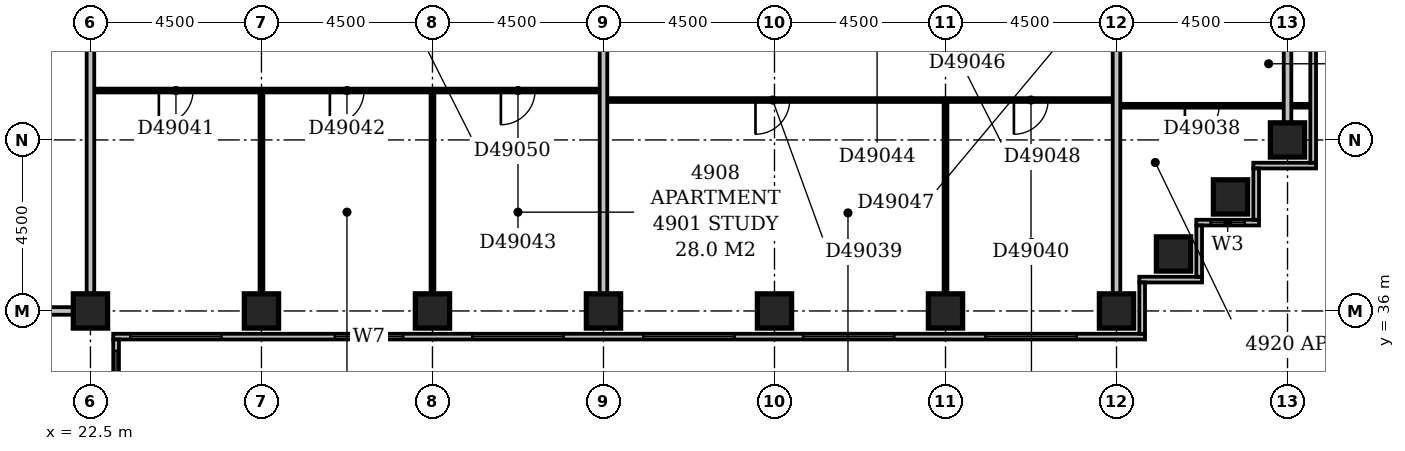
"""IFC4 building model, lengths in metres.
Left out: names, types, materials, properties, quantities, classifications, styles, units other than length and angle.
Written with IfcOpenShell. Run it as: python <this file> out.ifc"""

import sys

from ifc_helpers import new_model, si_unit, direction, frame, frame_2d, origin, origin_2d, place, context, subcontext, project, spatial, rectangle, extrude, element, fill, save


model = new_model("IFC4")
c1 = context("Model", 3, precision=1e-05, world=origin(), true_north=direction((0.0, 1.0)))
c2 = subcontext(c1, "Body", "Model", "MODEL_VIEW")
j1 = project(units=[si_unit("LENGTHUNIT", "METRE"), si_unit("PLANEANGLEUNIT", "RADIAN")], contexts=[c1])
p1 = place(None, origin())
s1 = spatial("IfcSite", under=j1, at=p1, CompositionType="ELEMENT")
p2 = place(p1, origin())
s2 = spatial("IfcBuilding", under=s1, at=p2, CompositionType="ELEMENT")
p3 = place(p2, frame((0.0, 0.0, 193.4)))
s3 = spatial("IfcBuildingStorey", under=s2, at=p3, CompositionType="ELEMENT", Elevation=193.4)
for number, where, z_axis, x_axis in (
    (1, (22.5, 36.0, -0.3), (0.0, 0.0, 1.0), (1.0, 0.0, 0.0)),
    (2, (27.0, 36.0, -0.3), (0.0, 0.0, 1.0), (1.0, 0.0, 0.0)),
    (3, (31.5, 36.0, -0.3), (0.0, 0.0, 1.0), (1.0, 0.0, 0.0)),
    (4, (36.0, 36.0, -0.3), (0.0, 0.0, 1.0), (1.0, 0.0, 0.0)),
    (5, (40.5, 36.0, -0.3), (0.0, 0.0, 1.0), (1.0, 0.0, 0.0)),
    (6, (45.0, 36.0, -0.3), (0.0, 0.0, 1.0), (1.0, 0.0, 0.0)),
    (7, (49.5, 36.0, -0.3), (0.0, 0.0, 1.0), (1.0, 0.0, 0.0)),
    (8, (51.0, 37.5, -0.3), (0.0, 0.0, 1.0), (1.0, 0.0, 0.0)),
    (9, (52.5, 39.0, -0.3), (0.0, 0.0, 1.0), (1.0, 0.0, 0.0)),
    (10, (54.0, 40.5, -0.3), (0.0, 0.0, 1.0), (1.0, 0.0, 0.0)),
):
    element("IfcColumn", number, at=place(p3, frame(where, z_axis=z_axis, x_axis=x_axis)), inside=s3, PredefinedType="COLUMN", context=c2, shape_type="SweptSolid", body=[
        extrude(rectangle(XDim=0.9, YDim=0.9, at=origin_2d()), origin(), (0.0, 0.0, 1.0), 3.6),
    ])
p4 = place(p3, frame((23.175, 17.4, 0.0), z_axis=(0.0, 0.0, 1.0), x_axis=(0.0, 1.0, 0.0)))
e11 = element("IfcWall", 11, at=p4, inside=s3, PredefinedType="STANDARD", context=c2, shape_type="SweptSolid", body=[
    extrude(rectangle(XDim=17.85, YDim=0.15, at=frame_2d((8.925, 0.0))), origin(), (0.0, 0.0, 1.0), 2.7),
])
p5 = place(p4, frame((1.65, 0.0, 0.6)))
e12 = element("IfcOpeningElement", 12, at=p5, cuts=e11, PredefinedType="OPENING", context=c2, shape_type="SweptSolid", body=[
    extrude(rectangle(XDim=2.4, YDim=1.8, at=frame_2d((1.2, 0.9))), frame((0.0, 0.087, 0.0), z_axis=(0.0, -1.0, 0.0), x_axis=(1.0, 0.0, 0.0)), (0.0, 0.0, 1.0), 0.174),
])
p6 = place(p4, frame((7.922, 0.0, 0.6)))
e13 = element("IfcOpeningElement", 13, at=p6, cuts=e11, PredefinedType="OPENING", context=c2, shape_type="SweptSolid", body=[
    extrude(rectangle(XDim=0.9, YDim=1.8, at=frame_2d((0.45, 0.9))), frame((0.0, 0.087, 0.0), z_axis=(0.0, -1.0, 0.0), x_axis=(1.0, 0.0, 0.0)), (0.0, 0.0, 1.0), 0.174),
])
p7 = place(p4, frame((10.65, 0.0, 0.6)))
e14 = element("IfcOpeningElement", 14, at=p7, cuts=e11, PredefinedType="OPENING", context=c2, shape_type="SweptSolid", body=[
    extrude(rectangle(XDim=2.4, YDim=1.8, at=frame_2d((1.2, 0.9))), frame((0.0, 0.087, 0.0), z_axis=(0.0, -1.0, 0.0), x_axis=(1.0, 0.0, 0.0)), (0.0, 0.0, 1.0), 0.174),
])
p8 = place(p4, frame((15.15, 0.0, 0.6)))
e15 = element("IfcOpeningElement", 15, at=p8, cuts=e11, PredefinedType="OPENING", context=c2, shape_type="SweptSolid", body=[
    extrude(rectangle(XDim=2.4, YDim=1.8, at=frame_2d((1.2, 0.9))), frame((0.0, 0.087, 0.0), z_axis=(0.0, -1.0, 0.0), x_axis=(1.0, 0.0, 0.0)), (0.0, 0.0, 1.0), 0.174),
])
p9 = place(p3, frame((23.1, 35.325, 0.0), z_axis=(0.0, 0.0, 1.0), x_axis=(1.0, 0.0, 0.0)))
e16 = element("IfcWall", 16, at=p9, inside=s3, PredefinedType="STANDARD", context=c2, shape_type="SweptSolid", body=[
    extrude(rectangle(XDim=27.15, YDim=0.15, at=frame_2d((13.575, 0.0))), origin(), (0.0, 0.0, 1.0), 2.7),
])
p10 = place(p9, frame((0.45, 0.0, 0.6)))
e17 = element("IfcOpeningElement", 17, at=p10, cuts=e16, PredefinedType="OPENING", context=c2, shape_type="SweptSolid", body=[
    extrude(rectangle(XDim=2.4, YDim=1.8, at=frame_2d((1.2, 0.9))), frame((0.0, 0.087, 0.0), z_axis=(0.0, -1.0, 0.0), x_axis=(1.0, 0.0, 0.0)), (0.0, 0.0, 1.0), 0.174),
])
p11 = place(p9, frame((5.831, 0.0, 0.6)))
e18 = element("IfcOpeningElement", 18, at=p11, cuts=e16, PredefinedType="OPENING", context=c2, shape_type="SweptSolid", body=[
    extrude(rectangle(XDim=1.8, YDim=1.8, at=frame_2d((0.9, 0.9))), frame((0.0, 0.087, 0.0), z_axis=(0.0, -1.0, 0.0), x_axis=(1.0, 0.0, 0.0)), (0.0, 0.0, 1.0), 0.174),
])
p12 = place(p9, frame((9.45, 0.0, 0.6)))
e19 = element("IfcOpeningElement", 19, at=p12, cuts=e16, PredefinedType="OPENING", context=c2, shape_type="SweptSolid", body=[
    extrude(rectangle(XDim=2.4, YDim=1.8, at=frame_2d((1.2, 0.9))), frame((0.0, 0.087, 0.0), z_axis=(0.0, -1.0, 0.0), x_axis=(1.0, 0.0, 0.0)), (0.0, 0.0, 1.0), 0.174),
])
p13 = place(p9, frame((13.95, 0.0, 0.6)))
e20 = element("IfcOpeningElement", 20, at=p13, cuts=e16, PredefinedType="OPENING", context=c2, shape_type="SweptSolid", body=[
    extrude(rectangle(XDim=2.4, YDim=1.8, at=frame_2d((1.2, 0.9))), frame((0.0, 0.087, 0.0), z_axis=(0.0, -1.0, 0.0), x_axis=(1.0, 0.0, 0.0)), (0.0, 0.0, 1.0), 0.174),
])
p14 = place(p9, frame((18.153, 0.0, 0.6)))
e21 = element("IfcOpeningElement", 21, at=p14, cuts=e16, PredefinedType="OPENING", context=c2, shape_type="SweptSolid", body=[
    extrude(rectangle(XDim=2.4, YDim=1.8, at=frame_2d((1.2, 0.9))), frame((0.0, 0.087, 0.0), z_axis=(0.0, -1.0, 0.0), x_axis=(1.0, 0.0, 0.0)), (0.0, 0.0, 1.0), 0.174),
])
p15 = place(p9, frame((22.95, 0.0, 0.6)))
e22 = element("IfcOpeningElement", 22, at=p15, cuts=e16, PredefinedType="OPENING", context=c2, shape_type="SweptSolid", body=[
    extrude(rectangle(XDim=2.4, YDim=1.8, at=frame_2d((1.2, 0.9))), frame((0.0, 0.087, 0.0), z_axis=(0.0, -1.0, 0.0), x_axis=(1.0, 0.0, 0.0)), (0.0, 0.0, 1.0), 0.174),
])
p16 = place(p3, frame((50.175, 35.4, 0.0), z_axis=(0.0, 0.0, 1.0), x_axis=(0.0, 1.0, 0.0)))
e23 = element("IfcWall", 23, at=p16, inside=s3, PredefinedType="STANDARD", context=c2, shape_type="SweptSolid", body=[
    extrude(rectangle(XDim=1.35, YDim=0.15, at=frame_2d((0.675, 0.0))), origin(), (0.0, 0.0, 1.0), 2.7),
])
p17 = place(p3, frame((50.1, 36.825, 0.0), z_axis=(0.0, 0.0, 1.0), x_axis=(1.0, 0.0, 0.0)))
e24 = element("IfcWall", 24, at=p17, inside=s3, PredefinedType="STANDARD", context=c2, shape_type="SweptSolid", body=[
    extrude(rectangle(XDim=1.65, YDim=0.15, at=frame_2d((0.825, 0.0))), origin(), (0.0, 0.0, 1.0), 2.7),
])
p18 = place(p3, frame((51.675, 36.9, 0.0), z_axis=(0.0, 0.0, 1.0), x_axis=(0.0, 1.0, 0.0)))
e25 = element("IfcWall", 25, at=p18, inside=s3, PredefinedType="STANDARD", context=c2, shape_type="SweptSolid", body=[
    extrude(rectangle(XDim=1.35, YDim=0.15, at=frame_2d((0.675, 0.0))), origin(), (0.0, 0.0, 1.0), 2.7),
])
p19 = place(p3, frame((51.6, 38.325, 0.0), z_axis=(0.0, 0.0, 1.0), x_axis=(1.0, 0.0, 0.0)))
e26 = element("IfcWall", 26, at=p19, inside=s3, PredefinedType="STANDARD", context=c2, shape_type="SweptSolid", body=[
    extrude(rectangle(XDim=1.65, YDim=0.15, at=frame_2d((0.825, 0.0))), origin(), (0.0, 0.0, 1.0), 2.7),
])
p20 = place(p19, frame((0.375, 0.0, 0.6)))
e27 = element("IfcOpeningElement", 27, at=p20, cuts=e26, PredefinedType="OPENING", context=c2, shape_type="SweptSolid", body=[
    extrude(rectangle(XDim=0.9, YDim=1.8, at=frame_2d((0.45, 0.9))), frame((0.0, 0.087, 0.0), z_axis=(0.0, -1.0, 0.0), x_axis=(1.0, 0.0, 0.0)), (0.0, 0.0, 1.0), 0.174),
])
p21 = place(p3, frame((53.175, 38.4, 0.0), z_axis=(0.0, 0.0, 1.0), x_axis=(0.0, 1.0, 0.0)))
e28 = element("IfcWall", 28, at=p21, inside=s3, PredefinedType="STANDARD", context=c2, shape_type="SweptSolid", body=[
    extrude(rectangle(XDim=1.35, YDim=0.15, at=frame_2d((0.675, 0.0))), origin(), (0.0, 0.0, 1.0), 2.7),
])
p22 = place(p3, frame((53.1, 39.825, 0.0), z_axis=(0.0, 0.0, 1.0), x_axis=(1.0, 0.0, 0.0)))
e29 = element("IfcWall", 29, at=p22, inside=s3, PredefinedType="STANDARD", context=c2, shape_type="SweptSolid", body=[
    extrude(rectangle(XDim=1.65, YDim=0.15, at=frame_2d((0.825, 0.0))), origin(), (0.0, 0.0, 1.0), 2.7),
])
p23 = place(p3, frame((54.675, 39.9, 0.0), z_axis=(0.0, 0.0, 1.0), x_axis=(0.0, 1.0, 0.0)))
e30 = element("IfcWall", 30, at=p23, inside=s3, PredefinedType="STANDARD", context=c2, shape_type="SweptSolid", body=[
    extrude(rectangle(XDim=14.85, YDim=0.15, at=frame_2d((7.425, 0.0))), origin(), (0.0, 0.0, 1.0), 2.7),
])
p24 = place(p3, frame((9.1, 36.0, 0.0), z_axis=(0.0, 0.0, 1.0), x_axis=(1.0, 0.0, 0.0)))
e31 = element("IfcWall", 31, at=p24, inside=s3, PredefinedType="PARTITIONING", context=c2, shape_type="SweptSolid", body=[
    extrude(rectangle(XDim=12.95, YDim=0.2, at=frame_2d((6.475, 0.0))), origin(), (0.0, 0.0, 1.0), 3.3),
])
p25 = place(p3, frame((22.5, 36.45, 0.0), z_axis=(0.0, 0.0, 1.0), x_axis=(0.0, 1.0, 0.0)))
e32 = element("IfcWall", 32, at=p25, inside=s3, PredefinedType="PARTITIONING", context=c2, shape_type="SweptSolid", body=[
    extrude(rectangle(XDim=13.05, YDim=0.2, at=frame_2d((6.525, 0.0))), origin(), (0.0, 0.0, 1.0), 3.3),
])
p26 = place(p3, frame((27.0, 36.45, 0.0), z_axis=(0.0, 0.0, 1.0), x_axis=(0.0, 1.0, 0.0)))
e33 = element("IfcWall", 33, at=p26, inside=s3, PredefinedType="PARTITIONING", context=c2, shape_type="SweptSolid", body=[
    extrude(rectangle(XDim=5.3, YDim=0.1, at=frame_2d((2.65, 0.0))), origin(), (0.0, 0.0, 1.0), 2.4),
])
p27 = place(p3, frame((31.5, 36.45, 0.0), z_axis=(0.0, 0.0, 1.0), x_axis=(0.0, 1.0, 0.0)))
e34 = element("IfcWall", 34, at=p27, inside=s3, PredefinedType="PARTITIONING", context=c2, shape_type="SweptSolid", body=[
    extrude(rectangle(XDim=5.3, YDim=0.1, at=frame_2d((2.65, 0.0))), origin(), (0.0, 0.0, 1.0), 3.3),
])
p28 = place(p3, frame((36.0, 36.45, 0.0), z_axis=(0.0, 0.0, 1.0), x_axis=(0.0, 1.0, 0.0)))
e35 = element("IfcWall", 35, at=p28, inside=s3, PredefinedType="PARTITIONING", context=c2, shape_type="SweptSolid", body=[
    extrude(rectangle(XDim=12.95, YDim=0.2, at=frame_2d((6.475, 0.0))), origin(), (0.0, 0.0, 1.0), 2.4),
])
p29 = place(p3, frame((45.0, 36.45, 0.0), z_axis=(0.0, 0.0, 1.0), x_axis=(0.0, 1.0, 0.0)))
e36 = element("IfcWall", 36, at=p29, inside=s3, PredefinedType="PARTITIONING", context=c2, shape_type="SweptSolid", body=[
    extrude(rectangle(XDim=5.05, YDim=0.1, at=frame_2d((2.525, 0.0))), origin(), (0.0, 0.0, 1.0), 2.6),
])
p30 = place(p3, frame((49.5, 36.45, 0.0), z_axis=(0.0, 0.0, 1.0), x_axis=(0.0, 1.0, 0.0)))
e37 = element("IfcWall", 37, at=p30, inside=s3, PredefinedType="PARTITIONING", context=c2, shape_type="SweptSolid", body=[
    extrude(rectangle(XDim=12.95, YDim=0.2, at=frame_2d((6.475, 0.0))), origin(), (0.0, 0.0, 1.0), 3.3),
])
p31 = place(p3, frame((54.0, 40.95, 0.0), z_axis=(0.0, 0.0, 1.0), x_axis=(0.0, 1.0, 0.0)))
e38 = element("IfcWall", 38, at=p31, inside=s3, PredefinedType="PARTITIONING", context=c2, shape_type="SweptSolid", body=[
    extrude(rectangle(XDim=8.1, YDim=0.2, at=frame_2d((4.05, 0.0))), origin(), (0.0, 0.0, 1.0), 2.7),
])
p32 = place(p3, frame((49.6, 41.4, 0.0), z_axis=(0.0, 0.0, 1.0), x_axis=(1.0, 0.0, 0.0)))
e39 = element("IfcWall", 39, at=p32, inside=s3, PredefinedType="PARTITIONING", context=c2, shape_type="SweptSolid", body=[
    extrude(rectangle(XDim=5.0, YDim=0.1, at=frame_2d((2.5, 0.0))), origin(), (0.0, 0.0, 1.0), 3.3),
])
p33 = place(p32, frame((1.7, 0.0, 0.0)))
e40 = element("IfcOpeningElement", 40, at=p33, cuts=e39, PredefinedType="OPENING", context=c2, shape_type="SweptSolid", body=[
    extrude(rectangle(XDim=0.9, YDim=2.1, at=frame_2d((0.45, 1.05))), frame((0.0, 0.062, 0.0), z_axis=(0.0, -1.0, 0.0), x_axis=(1.0, 0.0, 0.0)), (0.0, 0.0, 1.0), 0.124),
])
p34 = place(p3, frame((36.1, 41.55, 0.0), z_axis=(0.0, 0.0, 1.0), x_axis=(1.0, 0.0, 0.0)))
e41 = element("IfcWall", 41, at=p34, inside=s3, PredefinedType="PARTITIONING", context=c2, shape_type="SweptSolid", body=[
    extrude(rectangle(XDim=13.3, YDim=0.1, at=frame_2d((6.65, 0.0))), origin(), (0.0, 0.0, 1.0), 3.3),
])
p35 = place(p34, frame((3.9, 0.0, 0.0)))
e42 = element("IfcOpeningElement", 42, at=p35, cuts=e41, PredefinedType="OPENING", context=c2, shape_type="SweptSolid", body=[
    extrude(rectangle(XDim=0.9, YDim=2.1, at=frame_2d((0.45, 1.05))), frame((0.0, 0.062, 0.0), z_axis=(0.0, -1.0, 0.0), x_axis=(1.0, 0.0, 0.0)), (0.0, 0.0, 1.0), 0.124),
])
p36 = place(p34, frame((10.7, 0.0, 0.0)))
e43 = element("IfcOpeningElement", 43, at=p36, cuts=e41, PredefinedType="OPENING", context=c2, shape_type="SweptSolid", body=[
    extrude(rectangle(XDim=0.9, YDim=2.1, at=frame_2d((0.45, 1.05))), frame((0.0, 0.062, 0.0), z_axis=(0.0, -1.0, 0.0), x_axis=(1.0, 0.0, 0.0)), (0.0, 0.0, 1.0), 0.124),
])
p37 = place(p3, frame((22.6, 41.8, 0.0), z_axis=(0.0, 0.0, 1.0), x_axis=(1.0, 0.0, 0.0)))
e44 = element("IfcWall", 44, at=p37, inside=s3, PredefinedType="PARTITIONING", context=c2, shape_type="SweptSolid", body=[
    extrude(rectangle(XDim=13.3, YDim=0.1, at=frame_2d((6.65, 0.0))), origin(), (0.0, 0.0, 1.0), 3.3),
])
p38 = place(p37, frame((1.7, 0.0, 0.0)))
e45 = element("IfcOpeningElement", 45, at=p38, cuts=e44, PredefinedType="OPENING", context=c2, shape_type="SweptSolid", body=[
    extrude(rectangle(XDim=0.9, YDim=2.1, at=frame_2d((0.45, 1.05))), frame((0.0, 0.062, 0.0), z_axis=(0.0, -1.0, 0.0), x_axis=(1.0, 0.0, 0.0)), (0.0, 0.0, 1.0), 0.124),
])
p39 = place(p37, frame((6.2, 0.0, 0.0)))
e46 = element("IfcOpeningElement", 46, at=p39, cuts=e44, PredefinedType="OPENING", context=c2, shape_type="SweptSolid", body=[
    extrude(rectangle(XDim=0.9, YDim=2.1, at=frame_2d((0.45, 1.05))), frame((0.0, 0.062, 0.0), z_axis=(0.0, -1.0, 0.0), x_axis=(1.0, 0.0, 0.0)), (0.0, 0.0, 1.0), 0.124),
])
p40 = place(p37, frame((10.7, 0.0, 0.0)))
e47 = element("IfcOpeningElement", 47, at=p40, cuts=e44, PredefinedType="OPENING", context=c2, shape_type="SweptSolid", body=[
    extrude(rectangle(XDim=0.9, YDim=2.1, at=frame_2d((0.45, 1.05))), frame((0.0, 0.062, 0.0), z_axis=(0.0, -1.0, 0.0), x_axis=(1.0, 0.0, 0.0)), (0.0, 0.0, 1.0), 0.124),
])
p41 = place(p8, origin())
e48 = element("IfcWindow", 48, at=p41, inside=s3, PartitioningType="SINGLE_PANEL", PredefinedType="WINDOW", context=c2, shape_type="SweptSolid", body=[
    extrude(rectangle(XDim=2.4, YDim=1.8, at=frame_2d((1.2, 0.9))), frame((0.0, 0.03, 0.0), z_axis=(0.0, -1.0, 0.0), x_axis=(1.0, 0.0, 0.0)), (0.0, 0.0, 1.0), 0.06),
])
fill(e15, e48)
p42 = place(p10, origin())
e49 = element("IfcWindow", 49, at=p42, inside=s3, PartitioningType="SINGLE_PANEL", PredefinedType="WINDOW", context=c2, shape_type="SweptSolid", body=[
    extrude(rectangle(XDim=2.4, YDim=1.8, at=frame_2d((1.2, 0.9))), frame((0.0, 0.03, 0.0), z_axis=(0.0, -1.0, 0.0), x_axis=(1.0, 0.0, 0.0)), (0.0, 0.0, 1.0), 0.06),
])
fill(e17, e49)
p43 = place(p11, origin())
e50 = element("IfcWindow", 50, at=p43, inside=s3, PartitioningType="SINGLE_PANEL", PredefinedType="WINDOW", context=c2, shape_type="SweptSolid", body=[
    extrude(rectangle(XDim=1.8, YDim=1.8, at=frame_2d((0.9, 0.9))), frame((0.0, 0.03, 0.0), z_axis=(0.0, -1.0, 0.0), x_axis=(1.0, 0.0, 0.0)), (0.0, 0.0, 1.0), 0.06),
])
fill(e18, e50)
p44 = place(p12, origin())
e51 = element("IfcWindow", 51, at=p44, inside=s3, PartitioningType="SINGLE_PANEL", PredefinedType="WINDOW", context=c2, shape_type="SweptSolid", body=[
    extrude(rectangle(XDim=2.4, YDim=1.8, at=frame_2d((1.2, 0.9))), frame((0.0, 0.03, 0.0), z_axis=(0.0, -1.0, 0.0), x_axis=(1.0, 0.0, 0.0)), (0.0, 0.0, 1.0), 0.06),
])
fill(e19, e51)
p45 = place(p13, origin())
e52 = element("IfcWindow", 52, at=p45, inside=s3, PartitioningType="SINGLE_PANEL", PredefinedType="WINDOW", context=c2, shape_type="SweptSolid", body=[
    extrude(rectangle(XDim=2.4, YDim=1.8, at=frame_2d((1.2, 0.9))), frame((0.0, 0.03, 0.0), z_axis=(0.0, -1.0, 0.0), x_axis=(1.0, 0.0, 0.0)), (0.0, 0.0, 1.0), 0.06),
])
fill(e20, e52)
p46 = place(p14, origin())
e53 = element("IfcWindow", 53, at=p46, inside=s3, PartitioningType="SINGLE_PANEL", PredefinedType="WINDOW", context=c2, shape_type="SweptSolid", body=[
    extrude(rectangle(XDim=2.4, YDim=1.8, at=frame_2d((1.2, 0.9))), frame((0.0, 0.03, 0.0), z_axis=(0.0, -1.0, 0.0), x_axis=(1.0, 0.0, 0.0)), (0.0, 0.0, 1.0), 0.06),
])
fill(e21, e53)
p47 = place(p15, origin())
e54 = element("IfcWindow", 54, at=p47, inside=s3, PartitioningType="SINGLE_PANEL", PredefinedType="WINDOW", context=c2, shape_type="SweptSolid", body=[
    extrude(rectangle(XDim=2.4, YDim=1.8, at=frame_2d((1.2, 0.9))), frame((0.0, 0.03, 0.0), z_axis=(0.0, -1.0, 0.0), x_axis=(1.0, 0.0, 0.0)), (0.0, 0.0, 1.0), 0.06),
])
fill(e22, e54)
p48 = place(p20, origin())
e55 = element("IfcWindow", 55, at=p48, inside=s3, PartitioningType="SINGLE_PANEL", PredefinedType="WINDOW", context=c2, shape_type="SweptSolid", body=[
    extrude(rectangle(XDim=0.9, YDim=1.8, at=frame_2d((0.45, 0.9))), frame((0.0, 0.03, 0.0), z_axis=(0.0, -1.0, 0.0), x_axis=(1.0, 0.0, 0.0)), (0.0, 0.0, 1.0), 0.06),
])
fill(e27, e55)
p49 = place(p33, frame((0.9, 0.0, 0.0), z_axis=(0.0, 0.0, 1.0), x_axis=(-1.0, 0.0, 0.0)))
e56 = element("IfcDoor", 56, at=p49, inside=s3, OperationType="SINGLE_SWING_RIGHT", PredefinedType="DOOR", context=c2, shape_type="SweptSolid", body=[
    extrude(rectangle(XDim=0.9, YDim=2.1, at=frame_2d((0.45, 1.05))), frame((0.0, 0.025, 0.0), z_axis=(0.0, -1.0, 0.0), x_axis=(1.0, 0.0, 0.0)), (0.0, 0.0, 1.0), 0.05),
])
fill(e40, e56)
p50 = place(p35, frame((0.9, 0.0, 0.0), z_axis=(0.0, 0.0, 1.0), x_axis=(-1.0, 0.0, 0.0)))
e57 = element("IfcDoor", 57, at=p50, inside=s3, OperationType="SINGLE_SWING_RIGHT", PredefinedType="DOOR", context=c2, shape_type="SweptSolid", body=[
    extrude(rectangle(XDim=0.9, YDim=2.1, at=frame_2d((0.45, 1.05))), frame((0.0, 0.025, 0.0), z_axis=(0.0, -1.0, 0.0), x_axis=(1.0, 0.0, 0.0)), (0.0, 0.0, 1.0), 0.05),
])
fill(e42, e57)
p51 = place(p36, frame((0.9, 0.0, 0.0), z_axis=(0.0, 0.0, 1.0), x_axis=(-1.0, 0.0, 0.0)))
e58 = element("IfcDoor", 58, at=p51, inside=s3, OperationType="SINGLE_SWING_RIGHT", PredefinedType="DOOR", context=c2, shape_type="SweptSolid", body=[
    extrude(rectangle(XDim=0.9, YDim=2.1, at=frame_2d((0.45, 1.05))), frame((0.0, 0.025, 0.0), z_axis=(0.0, -1.0, 0.0), x_axis=(1.0, 0.0, 0.0)), (0.0, 0.0, 1.0), 0.05),
])
fill(e43, e58)
p52 = place(p38, frame((0.9, 0.0, 0.0), z_axis=(0.0, 0.0, 1.0), x_axis=(-1.0, 0.0, 0.0)))
e59 = element("IfcDoor", 59, at=p52, inside=s3, OperationType="SINGLE_SWING_RIGHT", PredefinedType="DOOR", context=c2, shape_type="SweptSolid", body=[
    extrude(rectangle(XDim=0.9, YDim=2.1, at=frame_2d((0.45, 1.05))), frame((0.0, 0.025, 0.0), z_axis=(0.0, -1.0, 0.0), x_axis=(1.0, 0.0, 0.0)), (0.0, 0.0, 1.0), 0.05),
])
fill(e45, e59)
p53 = place(p39, frame((0.9, 0.0, 0.0), z_axis=(0.0, 0.0, 1.0), x_axis=(-1.0, 0.0, 0.0)))
e60 = element("IfcDoor", 60, at=p53, inside=s3, OperationType="SINGLE_SWING_RIGHT", PredefinedType="DOOR", context=c2, shape_type="SweptSolid", body=[
    extrude(rectangle(XDim=0.9, YDim=2.1, at=frame_2d((0.45, 1.05))), frame((0.0, 0.025, 0.0), z_axis=(0.0, -1.0, 0.0), x_axis=(1.0, 0.0, 0.0)), (0.0, 0.0, 1.0), 0.05),
])
fill(e46, e60)
p54 = place(p40, frame((0.9, 0.0, 0.0), z_axis=(0.0, 0.0, 1.0), x_axis=(-1.0, 0.0, 0.0)))
e61 = element("IfcDoor", 61, at=p54, inside=s3, OperationType="SINGLE_SWING_RIGHT", PredefinedType="DOOR", context=c2, shape_type="SweptSolid", body=[
    extrude(rectangle(XDim=0.9, YDim=2.1, at=frame_2d((0.45, 1.05))), frame((0.0, 0.025, 0.0), z_axis=(0.0, -1.0, 0.0), x_axis=(1.0, 0.0, 0.0)), (0.0, 0.0, 1.0), 0.05),
])
fill(e47, e61)
save(model, sys.argv[1])
